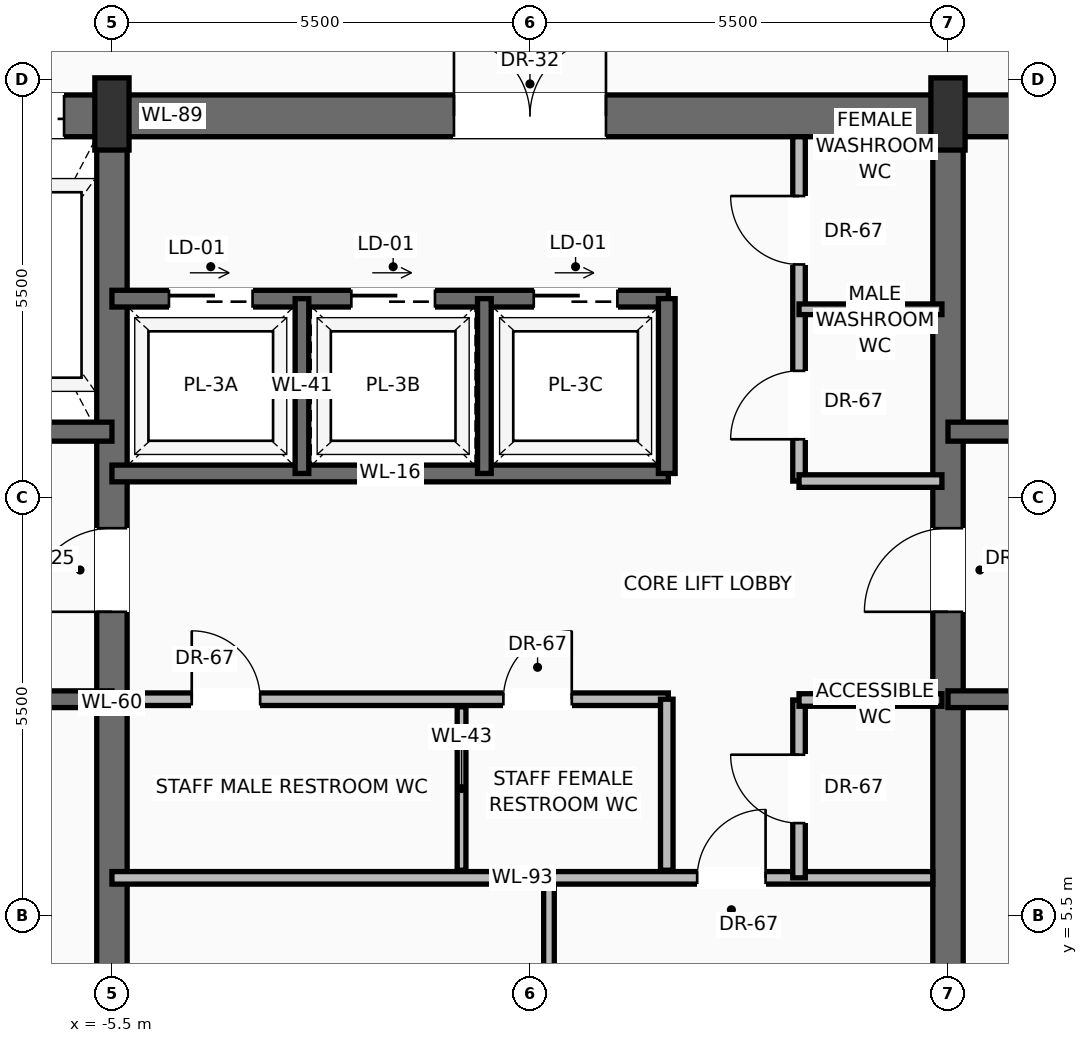
"""IFC4 building model, lengths in metres.
Left out: names, types, materials, properties, quantities, classifications, styles, units other than length and angle.
Written with IfcOpenShell. Run it as: python <this file> out.ifc"""

import sys

from ifc_helpers import new_model, si_unit, direction, frame, frame_2d, origin, origin_2d, place, context, subcontext, project, spatial, rectangle, extrude, source, transform, mapped, element, fill, save


model = new_model("IFC4")
c1 = context("Model", 3, precision=1e-05, world=origin(), true_north=direction((0.0, 1.0)))
c2 = subcontext(c1, "Body", "Model", "MODEL_VIEW")
j1 = project(units=[si_unit("LENGTHUNIT", "METRE"), si_unit("PLANEANGLEUNIT", "RADIAN")], contexts=[c1])
p1 = place(None, origin())
s1 = spatial("IfcSite", under=j1, at=p1, CompositionType="ELEMENT")
p2 = place(p1, origin())
s2 = spatial("IfcBuilding", under=s1, at=p2, CompositionType="ELEMENT")
p3 = place(p2, frame((0.0, 0.0, 257.95)))
s3 = spatial("IfcBuildingStorey", under=s2, at=p3, CompositionType="ELEMENT", Elevation=257.95)
p4 = place(p3, frame((-10.7, 16.025, 0.0), z_axis=(0.0, 0.0, 1.0), x_axis=(1.0, 0.0, 0.0)))
e1 = element("IfcWall", 1, at=p4, inside=s3, PredefinedType="SHEAR", context=c2, shape_type="SweptSolid", body=[
    extrude(rectangle(XDim=21.4, YDim=0.55, at=frame_2d((10.7, 0.0))), origin(), (0.0, 0.0, 1.0), 4.49),
])
p5 = place(p4, frame((3.27, 0.0, 0.0)))
e2 = element("IfcOpeningElement", 2, at=p5, cuts=e1, PredefinedType="OPENING", context=c2, shape_type="SweptSolid", body=[
    extrude(rectangle(XDim=1.3, YDim=2.3, at=frame_2d((0.65, 1.15))), frame((0.0, 0.285, 0.0), z_axis=(0.0, -1.0, 0.0), x_axis=(1.0, 0.0, 0.0)), (0.0, 0.0, 1.0), 0.57),
])
p6 = place(p4, frame((9.7, 0.0, 0.0)))
e3 = element("IfcOpeningElement", 3, at=p6, cuts=e1, PredefinedType="OPENING", context=c2, shape_type="SweptSolid", body=[
    extrude(rectangle(XDim=2.0, YDim=2.4, at=frame_2d((1.0, 1.2))), frame((0.0, 0.285, 0.0), z_axis=(0.0, -1.0, 0.0), x_axis=(1.0, 0.0, 0.0)), (0.0, 0.0, 1.0), 0.57),
])
p7 = place(p3, frame((-5.5, 0.575, 0.0), z_axis=(0.0, 0.0, 1.0), x_axis=(0.0, 1.0, 0.0)))
e4 = element("IfcWall", 4, at=p7, inside=s3, PredefinedType="SHEAR", context=c2, shape_type="SweptSolid", body=[
    extrude(rectangle(XDim=15.45, YDim=0.4, at=frame_2d((7.725, 0.0))), origin(), (0.0, 0.0, 1.0), 4.49),
])
p8 = place(p7, frame((8.925, 0.0, 0.0)))
e5 = element("IfcOpeningElement", 5, at=p8, cuts=e4, PredefinedType="OPENING", context=c2, shape_type="SweptSolid", body=[
    extrude(rectangle(XDim=1.1, YDim=2.2, at=frame_2d((0.55, 1.1))), frame((0.0, 0.21, 0.0), z_axis=(0.0, -1.0, 0.0), x_axis=(1.0, 0.0, 0.0)), (0.0, 0.0, 1.0), 0.42),
])
p9 = place(p3, frame((5.5, 0.575, 0.0), z_axis=(0.0, 0.0, 1.0), x_axis=(0.0, 1.0, 0.0)))
e6 = element("IfcWall", 6, at=p9, inside=s3, PredefinedType="SHEAR", context=c2, shape_type="SweptSolid", body=[
    extrude(rectangle(XDim=15.45, YDim=0.4, at=frame_2d((7.725, 0.0))), origin(), (0.0, 0.0, 1.0), 4.49),
])
p10 = place(p9, frame((8.925, 0.0, 0.0)))
e7 = element("IfcOpeningElement", 7, at=p10, cuts=e6, PredefinedType="OPENING", context=c2, shape_type="SweptSolid", body=[
    extrude(rectangle(XDim=1.1, YDim=2.2, at=frame_2d((0.55, 1.1))), frame((0.0, 0.21, 0.0), z_axis=(0.0, -1.0, 0.0), x_axis=(1.0, 0.0, 0.0)), (0.0, 0.0, 1.0), 0.42),
])
m1 = source(origin(), c2, "Body", "SweptSolid", [
    extrude(rectangle(XDim=0.45, YDim=0.95, at=origin_2d()), origin(), (0.0, 0.0, 1.0), 4.7),
])
for number, where, z_axis, x_axis in (
    (8, (-5.5, 16.05, 0.0), (0.0, 0.0, 1.0), (1.0, 0.0, 0.0)),
    (9, (5.5, 16.05, 0.0), (0.0, 0.0, 1.0), (1.0, 0.0, 0.0)),
):
    element("IfcColumn", number, at=place(p3, frame(where, z_axis=z_axis, x_axis=x_axis)), inside=s3, PredefinedType="PILASTER", context=c2, shape_type="MappedRepresentation", body=[
        mapped(m1, transform((0.0, 0.0, 0.0), scale=1.0)),
    ])
p11 = place(p3, frame((-5.5, 8.35, 0.0), z_axis=(0.0, 0.0, 1.0), x_axis=(-1.0, 0.0, 0.0)))
e10 = element("IfcWall", 10, at=p11, inside=s3, PredefinedType="SOLIDWALL", context=c2, shape_type="SweptSolid", body=[
    extrude(rectangle(XDim=4.65, YDim=0.22, at=frame_2d((2.325, 0.0))), origin(), (0.0, 0.0, 1.0), 4.49),
])
p12 = place(p11, frame((2.5, 0.0, 0.0)))
e11 = element("IfcOpeningElement", 11, at=p12, cuts=e10, PredefinedType="OPENING", context=c2, shape_type="SweptSolid", body=[
    extrude(rectangle(XDim=1.15, YDim=2.2, at=frame_2d((0.575, 1.1))), frame((0.0, 0.12, 0.0), z_axis=(0.0, -1.0, 0.0), x_axis=(1.0, 0.0, 0.0)), (0.0, 0.0, 1.0), 0.24),
])
p13 = place(p3, frame((-5.5, 11.87, 0.0), z_axis=(0.0, 0.0, 1.0), x_axis=(-1.0, 0.0, 0.0)))
e12 = element("IfcWall", 12, at=p13, inside=s3, PredefinedType="SOLIDWALL", context=c2, shape_type="SweptSolid", body=[
    extrude(rectangle(XDim=4.65, YDim=0.25, at=frame_2d((2.325, 0.0))), origin(), (0.0, 0.0, 1.0), 4.49),
])
p14 = place(p13, frame((2.95, 0.0, 0.0)))
e13 = element("IfcOpeningElement", 13, at=p14, cuts=e12, PredefinedType="OPENING", context=c2, shape_type="SweptSolid", body=[
    extrude(rectangle(XDim=1.2, YDim=2.25, at=frame_2d((0.6, 1.125))), frame((0.0, 0.135, 0.0), z_axis=(0.0, -1.0, 0.0), x_axis=(1.0, 0.0, 0.0)), (0.0, 0.0, 1.0), 0.27),
])
p15 = place(p3, frame((10.15, 8.35, 0.0), z_axis=(0.0, 0.0, 1.0), x_axis=(-1.0, 0.0, 0.0)))
e14 = element("IfcWall", 14, at=p15, inside=s3, PredefinedType="SOLIDWALL", context=c2, shape_type="SweptSolid", body=[
    extrude(rectangle(XDim=4.65, YDim=0.22, at=frame_2d((2.325, 0.0))), origin(), (0.0, 0.0, 1.0), 4.49),
])
p16 = place(p15, frame((1.0, 0.0, 0.0)))
e15 = element("IfcOpeningElement", 15, at=p16, cuts=e14, PredefinedType="OPENING", context=c2, shape_type="SweptSolid", body=[
    extrude(rectangle(XDim=1.15, YDim=2.2, at=frame_2d((0.575, 1.1))), frame((0.0, 0.12, 0.0), z_axis=(0.0, -1.0, 0.0), x_axis=(1.0, 0.0, 0.0)), (0.0, 0.0, 1.0), 0.24),
])
p17 = place(p3, frame((10.15, 11.87, 0.0), z_axis=(0.0, 0.0, 1.0), x_axis=(-1.0, 0.0, 0.0)))
e16 = element("IfcWall", 16, at=p17, inside=s3, PredefinedType="SOLIDWALL", context=c2, shape_type="SweptSolid", body=[
    extrude(rectangle(XDim=4.65, YDim=0.25, at=frame_2d((2.325, 0.0))), origin(), (0.0, 0.0, 1.0), 4.49),
])
p18 = place(p17, frame((0.5, 0.0, 0.0)))
e17 = element("IfcOpeningElement", 17, at=p18, cuts=e16, PredefinedType="OPENING", context=c2, shape_type="SweptSolid", body=[
    extrude(rectangle(XDim=1.2, YDim=2.25, at=frame_2d((0.6, 1.125))), frame((0.0, 0.135, 0.0), z_axis=(0.0, -1.0, 0.0), x_axis=(1.0, 0.0, 0.0)), (0.0, 0.0, 1.0), 0.27),
])
p19 = place(p3, frame((-5.5, 6.0, 0.0), z_axis=(0.0, 0.0, 1.0), x_axis=(1.0, 0.0, 0.0)))
e18 = element("IfcWall", 18, at=p19, inside=s3, PredefinedType="PARTITIONING", context=c2, shape_type="SweptSolid", body=[
    extrude(rectangle(XDim=10.8, YDim=0.165, at=frame_2d((5.4, 0.0))), origin(), (0.0, 0.0, 1.0), 4.482),
])
p20 = place(p19, frame((7.7, 0.0, 0.0)))
e19 = element("IfcOpeningElement", 19, at=p20, cuts=e18, PredefinedType="OPENING", context=c2, shape_type="SweptSolid", body=[
    extrude(rectangle(XDim=0.9, YDim=2.1, at=frame_2d((0.45, 1.05))), frame((0.0, 0.093, 0.0), z_axis=(0.0, -1.0, 0.0), x_axis=(1.0, 0.0, 0.0)), (0.0, 0.0, 1.0), 0.185),
])
p21 = place(p3, frame((0.25, 0.85, 0.0), z_axis=(0.0, 0.0, 1.0), x_axis=(0.0, 1.0, 0.0)))
e20 = element("IfcWall", 20, at=p21, inside=s3, PredefinedType="PARTITIONING", context=c2, shape_type="SweptSolid", body=[
    extrude(rectangle(XDim=5.03, YDim=0.14, at=frame_2d((2.515, 0.0))), origin(), (0.0, 0.0, 1.0), 4.482),
])
p22 = place(p21, frame((2.1, 0.0, 0.0)))
e21 = element("IfcOpeningElement", 21, at=p22, cuts=e20, PredefinedType="OPENING", context=c2, shape_type="SweptSolid", body=[
    extrude(rectangle(XDim=0.9, YDim=2.1, at=frame_2d((0.45, 1.05))), frame((0.0, 0.08, 0.0), z_axis=(0.0, -1.0, 0.0), x_axis=(1.0, 0.0, 0.0)), (0.0, 0.0, 1.0), 0.16),
])
p23 = place(p3, frame((3.54, 6.0, 0.0), z_axis=(0.0, 0.0, 1.0), x_axis=(0.0, 1.0, 0.0)))
e22 = element("IfcWall", 22, at=p23, inside=s3, PredefinedType="PARTITIONING", context=c2, shape_type="SweptSolid", body=[
    extrude(rectangle(XDim=2.34, YDim=0.165, at=frame_2d((1.17, 0.0))), origin(), (0.0, 0.0, 1.0), 4.482),
])
p24 = place(p23, frame((0.72, 0.0, 0.0)))
e23 = element("IfcOpeningElement", 23, at=p24, cuts=e22, PredefinedType="OPENING", context=c2, shape_type="SweptSolid", body=[
    extrude(rectangle(XDim=0.9, YDim=2.1, at=frame_2d((0.45, 1.05))), frame((0.0, 0.093, 0.0), z_axis=(0.0, -1.0, 0.0), x_axis=(1.0, 0.0, 0.0)), (0.0, 0.0, 1.0), 0.185),
])
p25 = place(p3, frame((3.54, 8.34, 0.0), z_axis=(0.0, 0.0, 1.0), x_axis=(1.0, 0.0, 0.0)))
e24 = element("IfcWall", 24, at=p25, inside=s3, PredefinedType="PARTITIONING", context=c2, shape_type="SweptSolid", body=[
    extrude(rectangle(XDim=1.88, YDim=0.165, at=frame_2d((0.94, 0.0))), origin(), (0.0, 0.0, 1.0), 4.482),
])
p26 = place(p3, frame((-5.3, 8.35, 0.0), z_axis=(0.0, 0.0, 1.0), x_axis=(1.0, 0.0, 0.0)))
e25 = element("IfcWall", 25, at=p26, inside=s3, PredefinedType="PARTITIONING", context=c2, shape_type="SweptSolid", body=[
    extrude(rectangle(XDim=7.12, YDim=0.165, at=frame_2d((3.56, 0.0))), origin(), (0.0, 0.0, 1.0), 4.482),
])
p27 = place(p26, frame((0.85, 0.0, 0.0)))
e26 = element("IfcOpeningElement", 26, at=p27, cuts=e25, PredefinedType="OPENING", context=c2, shape_type="SweptSolid", body=[
    extrude(rectangle(XDim=0.9, YDim=2.1, at=frame_2d((0.45, 1.05))), frame((0.0, 0.093, 0.0), z_axis=(0.0, -1.0, 0.0), x_axis=(1.0, 0.0, 0.0)), (0.0, 0.0, 1.0), 0.185),
])
p28 = place(p26, frame((4.95, 0.0, 0.0)))
e27 = element("IfcOpeningElement", 27, at=p28, cuts=e25, PredefinedType="OPENING", context=c2, shape_type="SweptSolid", body=[
    extrude(rectangle(XDim=0.9, YDim=2.1, at=frame_2d((0.45, 1.05))), frame((0.0, 0.093, 0.0), z_axis=(0.0, -1.0, 0.0), x_axis=(1.0, 0.0, 0.0)), (0.0, 0.0, 1.0), 0.185),
])
p29 = place(p3, frame((1.8, 6.1, 0.0), z_axis=(0.0, 0.0, 1.0), x_axis=(0.0, 1.0, 0.0)))
e28 = element("IfcWall", 28, at=p29, inside=s3, PredefinedType="PARTITIONING", context=c2, shape_type="SweptSolid", body=[
    extrude(rectangle(XDim=2.25, YDim=0.165, at=frame_2d((1.125, 0.0))), origin(), (0.0, 0.0, 1.0), 4.482),
])
p30 = place(p3, frame((-0.9, 6.1, 0.0), z_axis=(0.0, 0.0, 1.0), x_axis=(0.0, 1.0, 0.0)))
e29 = element("IfcWall", 29, at=p30, inside=s3, PredefinedType="PARTITIONING", context=c2, shape_type="SweptSolid", body=[
    extrude(rectangle(XDim=2.15, YDim=0.115, at=frame_2d((1.075, 0.0))), origin(), (0.0, 0.0, 1.0), 4.482),
])
p31 = place(p3, frame((-5.5, 11.32, 0.0), z_axis=(0.0, 0.0, 1.0), x_axis=(1.0, 0.0, 0.0)))
e30 = element("IfcWall", 30, at=p31, inside=s3, PredefinedType="SOLIDWALL", context=c2, shape_type="SweptSolid", body=[
    extrude(rectangle(XDim=7.32, YDim=0.22, at=frame_2d((3.66, 0.0))), origin(), (0.0, 0.0, 1.0), 4.49),
])
p32 = place(p3, frame((-5.5, 13.62, 0.0), z_axis=(0.0, 0.0, 1.0), x_axis=(1.0, 0.0, 0.0)))
e31 = element("IfcWall", 31, at=p32, inside=s3, PredefinedType="SOLIDWALL", context=c2, shape_type="SweptSolid", body=[
    extrude(rectangle(XDim=7.32, YDim=0.22, at=frame_2d((3.66, 0.0))), origin(), (0.0, 0.0, 1.0), 4.49),
])
p33 = place(p32, frame((0.75, 0.0, 0.0)))
e32 = element("IfcOpeningElement", 32, at=p33, cuts=e31, PredefinedType="OPENING", context=c2, shape_type="SweptSolid", body=[
    extrude(rectangle(XDim=1.1, YDim=2.2, at=frame_2d((0.55, 1.1))), frame((0.0, 0.12, 0.0), z_axis=(0.0, -1.0, 0.0), x_axis=(1.0, 0.0, 0.0)), (0.0, 0.0, 1.0), 0.24),
])
p34 = place(p32, frame((3.15, 0.0, 0.0)))
e33 = element("IfcOpeningElement", 33, at=p34, cuts=e31, PredefinedType="OPENING", context=c2, shape_type="SweptSolid", body=[
    extrude(rectangle(XDim=1.1, YDim=2.2, at=frame_2d((0.55, 1.1))), frame((0.0, 0.12, 0.0), z_axis=(0.0, -1.0, 0.0), x_axis=(1.0, 0.0, 0.0)), (0.0, 0.0, 1.0), 0.24),
])
p35 = place(p32, frame((5.55, 0.0, 0.0)))
e34 = element("IfcOpeningElement", 34, at=p35, cuts=e31, PredefinedType="OPENING", context=c2, shape_type="SweptSolid", body=[
    extrude(rectangle(XDim=1.1, YDim=2.2, at=frame_2d((0.55, 1.1))), frame((0.0, 0.12, 0.0), z_axis=(0.0, -1.0, 0.0), x_axis=(1.0, 0.0, 0.0)), (0.0, 0.0, 1.0), 0.24),
])
p36 = place(p3, frame((1.8, 11.32, 0.0), z_axis=(0.0, 0.0, 1.0), x_axis=(0.0, 1.0, 0.0)))
e35 = element("IfcWall", 35, at=p36, inside=s3, PredefinedType="SOLIDWALL", context=c2, shape_type="SweptSolid", body=[
    extrude(rectangle(XDim=2.3, YDim=0.22, at=frame_2d((1.15, 0.0))), origin(), (0.0, 0.0, 1.0), 4.49),
])
for number, where, z_axis, x_axis in (
    (36, (-3.0, 11.32, 0.0), (0.0, 0.0, 1.0), (0.0, 1.0, 0.0)),
    (37, (-0.6, 11.32, 0.0), (0.0, 0.0, 1.0), (0.0, 1.0, 0.0)),
):
    element("IfcWall", number, at=place(p3, frame(where, z_axis=z_axis, x_axis=x_axis)), inside=s3, PredefinedType="SOLIDWALL", context=c2, shape_type="SweptSolid", body=[
        extrude(rectangle(XDim=2.3, YDim=0.18, at=frame_2d((1.15, 0.0))), origin(), (0.0, 0.0, 1.0), 4.49),
    ])
p37 = place(p3, frame((3.54, 11.22, 0.0), z_axis=(0.0, 0.0, 1.0), x_axis=(0.0, 1.0, 0.0)))
e38 = element("IfcWall", 38, at=p37, inside=s3, PredefinedType="PARTITIONING", context=c2, shape_type="SweptSolid", body=[
    extrude(rectangle(XDim=4.53, YDim=0.165, at=frame_2d((2.265, 0.0))), origin(), (0.0, 0.0, 1.0), 4.482),
])
p38 = place(p37, frame((0.55, 0.0, 0.0)))
e39 = element("IfcOpeningElement", 39, at=p38, cuts=e38, PredefinedType="OPENING", context=c2, shape_type="SweptSolid", body=[
    extrude(rectangle(XDim=0.9, YDim=2.1, at=frame_2d((0.45, 1.05))), frame((0.0, 0.093, 0.0), z_axis=(0.0, -1.0, 0.0), x_axis=(1.0, 0.0, 0.0)), (0.0, 0.0, 1.0), 0.185),
])
p39 = place(p37, frame((2.85, 0.0, 0.0)))
e40 = element("IfcOpeningElement", 40, at=p39, cuts=e38, PredefinedType="OPENING", context=c2, shape_type="SweptSolid", body=[
    extrude(rectangle(XDim=0.9, YDim=2.1, at=frame_2d((0.45, 1.05))), frame((0.0, 0.093, 0.0), z_axis=(0.0, -1.0, 0.0), x_axis=(1.0, 0.0, 0.0)), (0.0, 0.0, 1.0), 0.185),
])
p40 = place(p3, frame((3.54, 11.22, 0.0), z_axis=(0.0, 0.0, 1.0), x_axis=(1.0, 0.0, 0.0)))
e41 = element("IfcWall", 41, at=p40, inside=s3, PredefinedType="PARTITIONING", context=c2, shape_type="SweptSolid", body=[
    extrude(rectangle(XDim=1.88, YDim=0.165, at=frame_2d((0.94, 0.0))), origin(), (0.0, 0.0, 1.0), 4.482),
])
p41 = place(p3, frame((3.54, 13.48, 0.0), z_axis=(0.0, 0.0, 1.0), x_axis=(1.0, 0.0, 0.0)))
e42 = element("IfcWall", 42, at=p41, inside=s3, PredefinedType="PARTITIONING", context=c2, shape_type="SweptSolid", body=[
    extrude(rectangle(XDim=1.88, YDim=0.14, at=frame_2d((0.94, 0.0))), origin(), (0.0, 0.0, 1.0), 4.482),
])
m2 = source(origin(), c2, "Body", "SweptSolid", [
    extrude(rectangle(XDim=1.1, YDim=2.2, at=frame_2d((0.55, 1.1))), frame((0.0, 0.025, 0.0), z_axis=(0.0, -1.0, 0.0), x_axis=(1.0, 0.0, 0.0)), (0.0, 0.0, 1.0), 0.05),
])
p42 = place(p8, origin())
e43 = element("IfcDoor", 43, at=p42, inside=s3, OperationType="SINGLE_SWING_LEFT", PredefinedType="DOOR", context=c2, shape_type="MappedRepresentation", body=[
    mapped(m2, transform((0.0, 0.0, 0.0), scale=1.0)),
])
fill(e5, e43)
m3 = source(origin(), c2, "Body", "SweptSolid", [
    extrude(rectangle(XDim=1.3, YDim=2.3, at=frame_2d((0.65, 1.15))), frame((0.0, 0.025, 0.0), z_axis=(0.0, -1.0, 0.0), x_axis=(1.0, 0.0, 0.0)), (0.0, 0.0, 1.0), 0.05),
])
p43 = place(p5, origin())
e44 = element("IfcDoor", 44, at=p43, inside=s3, OperationType="SLIDING_TO_RIGHT", PredefinedType="DOOR", context=c2, shape_type="MappedRepresentation", body=[
    mapped(m3, transform((0.0, 0.0, 0.0), scale=1.0)),
])
fill(e2, e44)
p44 = place(p10, origin())
e45 = element("IfcDoor", 45, at=p44, inside=s3, OperationType="SINGLE_SWING_LEFT", PredefinedType="DOOR", context=c2, shape_type="MappedRepresentation", body=[
    mapped(m2, transform((0.0, 0.0, 0.0), scale=1.0)),
])
fill(e7, e45)
m4 = source(origin(), c2, "Body", "SweptSolid", [
    extrude(rectangle(XDim=2.0, YDim=2.4, at=frame_2d((1.0, 1.2))), frame((0.0, 0.025, 0.0), z_axis=(0.0, -1.0, 0.0), x_axis=(1.0, 0.0, 0.0)), (0.0, 0.0, 1.0), 0.05),
])
p45 = place(p6, origin())
e46 = element("IfcDoor", 46, at=p45, inside=s3, OperationType="DOUBLE_DOOR_SINGLE_SWING", PredefinedType="DOOR", context=c2, shape_type="MappedRepresentation", body=[
    mapped(m4, transform((0.0, 0.0, 0.0), scale=1.0)),
])
fill(e3, e46)
m5 = source(origin(), c2, "Body", "SweptSolid", [
    extrude(rectangle(XDim=0.9, YDim=2.1, at=frame_2d((0.45, 1.05))), frame((0.0, 0.025, 0.0), z_axis=(0.0, -1.0, 0.0), x_axis=(1.0, 0.0, 0.0)), (0.0, 0.0, 1.0), 0.05),
])
p46 = place(p20, origin())
e47 = element("IfcDoor", 47, at=p46, inside=s3, OperationType="SINGLE_SWING_RIGHT", PredefinedType="DOOR", context=c2, shape_type="MappedRepresentation", body=[
    mapped(m5, transform((0.0, 0.0, 0.0), scale=1.0)),
])
fill(e19, e47)
p47 = place(p24, origin())
e48 = element("IfcDoor", 48, at=p47, inside=s3, OperationType="SINGLE_SWING_RIGHT", PredefinedType="DOOR", context=c2, shape_type="MappedRepresentation", body=[
    mapped(m5, transform((0.0, 0.0, 0.0), scale=1.0)),
])
fill(e23, e48)
p48 = place(p27, origin())
e49 = element("IfcDoor", 49, at=p48, inside=s3, OperationType="SINGLE_SWING_LEFT", PredefinedType="DOOR", context=c2, shape_type="MappedRepresentation", body=[
    mapped(m5, transform((0.0, 0.0, 0.0), scale=1.0)),
])
fill(e26, e49)
p49 = place(p28, origin())
e50 = element("IfcDoor", 50, at=p49, inside=s3, OperationType="SINGLE_SWING_RIGHT", PredefinedType="DOOR", context=c2, shape_type="MappedRepresentation", body=[
    mapped(m5, transform((0.0, 0.0, 0.0), scale=1.0)),
])
fill(e27, e50)
m6 = source(origin(), c2, "Body", "SweptSolid", [
    extrude(rectangle(XDim=1.1, YDim=2.2, at=frame_2d((0.55, 1.1))), frame((0.0, 0.025, 0.0), z_axis=(0.0, -1.0, 0.0), x_axis=(1.0, 0.0, 0.0)), (0.0, 0.0, 1.0), 0.05),
])
p50 = place(p33, origin())
e51 = element("IfcDoor", 51, at=p50, inside=s3, OperationType="SLIDING_TO_RIGHT", PredefinedType="DOOR", context=c2, shape_type="MappedRepresentation", body=[
    mapped(m6, transform((0.0, 0.0, 0.0), scale=1.0)),
])
fill(e32, e51)
p51 = place(p34, origin())
e52 = element("IfcDoor", 52, at=p51, inside=s3, OperationType="SLIDING_TO_RIGHT", PredefinedType="DOOR", context=c2, shape_type="MappedRepresentation", body=[
    mapped(m6, transform((0.0, 0.0, 0.0), scale=1.0)),
])
fill(e33, e52)
p52 = place(p35, origin())
e53 = element("IfcDoor", 53, at=p52, inside=s3, OperationType="SLIDING_TO_RIGHT", PredefinedType="DOOR", context=c2, shape_type="MappedRepresentation", body=[
    mapped(m6, transform((0.0, 0.0, 0.0), scale=1.0)),
])
fill(e34, e53)
p53 = place(p38, origin())
e54 = element("IfcDoor", 54, at=p53, inside=s3, OperationType="SINGLE_SWING_LEFT", PredefinedType="DOOR", context=c2, shape_type="MappedRepresentation", body=[
    mapped(m5, transform((0.0, 0.0, 0.0), scale=1.0)),
])
fill(e39, e54)
p54 = place(p39, origin())
e55 = element("IfcDoor", 55, at=p54, inside=s3, OperationType="SINGLE_SWING_RIGHT", PredefinedType="DOOR", context=c2, shape_type="MappedRepresentation", body=[
    mapped(m5, transform((0.0, 0.0, 0.0), scale=1.0)),
])
fill(e40, e55)
save(model, sys.argv[1])
